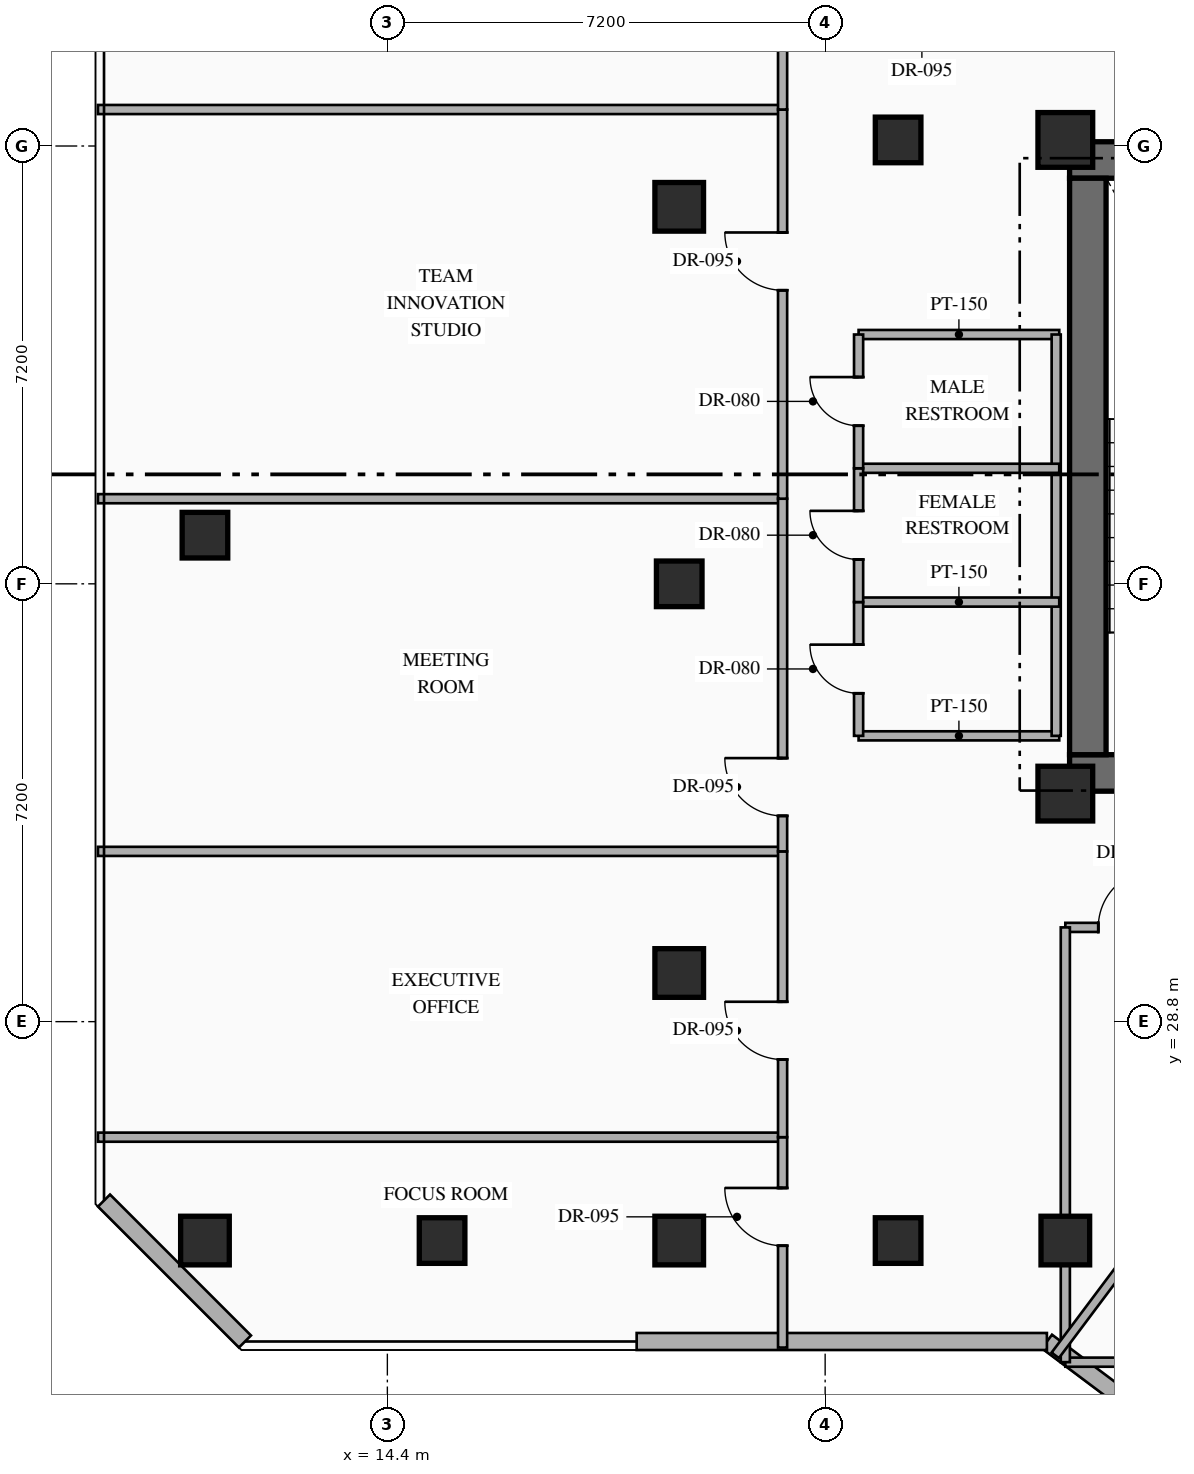
"""IFC4 building model, lengths in metres.
Left out: names, types, materials, properties, quantities, classifications, styles, units other than length and angle.
Written with IfcOpenShell. Run it as: python <this file> out.ifc"""

import sys

from ifc_helpers import new_model, si_unit, direction, frame, frame_2d, origin, origin_2d, place, context, subcontext, project, spatial, rectangle, hollow_rectangle, extrude, element, fill, save


model = new_model("IFC4")
c1 = context("Model", 3, precision=1e-05, world=origin(), true_north=direction((0.0, 1.0)))
c2 = subcontext(c1, "Body", "Model", "MODEL_VIEW")
j1 = project(units=[si_unit("LENGTHUNIT", "METRE"), si_unit("PLANEANGLEUNIT", "RADIAN")], contexts=[c1])
p1 = place(None, origin())
s1 = spatial("IfcSite", under=j1, at=p1, CompositionType="ELEMENT")
p2 = place(p1, origin())
s2 = spatial("IfcBuilding", under=s1, at=p2, CompositionType="ELEMENT")
p3 = place(p2, frame((0.0, 0.0, 163.65)))
s3 = spatial("IfcBuildingStorey", under=s2, at=p3, CompositionType="ELEMENT", Elevation=163.65)
p4 = place(p3, frame((25.62, 32.89, 0.0), z_axis=(0.0, 0.0, 1.0), x_axis=(1.0, 0.0, 0.0)))
e1 = element("IfcWall", 1, at=p4, inside=s3, PredefinedType="SHEAR", context=c2, shape_type="SweptSolid", body=[
    extrude(rectangle(XDim=7.78, YDim=0.6, at=frame_2d((3.89, 0.0))), origin(), (0.0, 0.0, 1.0), 3.6),
])
p5 = place(p4, frame((2.83, 0.0, 0.0)))
e2 = element("IfcOpeningElement", 2, at=p5, cuts=e1, PredefinedType="OPENING", context=c2, shape_type="SweptSolid", body=[
    extrude(rectangle(XDim=1.1, YDim=2.2, at=frame_2d((0.55, 1.1))), frame((0.0, 0.31, 0.0), z_axis=(0.0, -1.0, 0.0), x_axis=(1.0, 0.0, 0.0)), (0.0, 0.0, 1.0), 0.62),
])
p6 = place(p4, frame((5.58, 0.0, 0.0)))
e3 = element("IfcOpeningElement", 3, at=p6, cuts=e1, PredefinedType="OPENING", context=c2, shape_type="SweptSolid", body=[
    extrude(rectangle(XDim=1.1, YDim=2.15, at=frame_2d((0.55, 1.075))), frame((0.0, 0.31, 0.0), z_axis=(0.0, -1.0, 0.0), x_axis=(1.0, 0.0, 0.0)), (0.0, 0.0, 1.0), 0.62),
])
p7 = place(p3, frame((25.62, 42.97, 0.0), z_axis=(0.0, 0.0, 1.0), x_axis=(1.0, 0.0, 0.0)))
e4 = element("IfcWall", 4, at=p7, inside=s3, PredefinedType="SHEAR", context=c2, shape_type="SweptSolid", body=[
    extrude(rectangle(XDim=7.78, YDim=0.6, at=frame_2d((3.89, 0.0))), origin(), (0.0, 0.0, 1.0), 3.6),
])
p8 = place(p3, frame((25.92, 33.19, 0.0), z_axis=(0.0, 0.0, 1.0), x_axis=(0.0, 1.0, 0.0)))
e5 = element("IfcWall", 5, at=p8, inside=s3, PredefinedType="SHEAR", context=c2, shape_type="SweptSolid", body=[
    extrude(rectangle(XDim=9.48, YDim=0.6, at=frame_2d((4.74, 0.0))), origin(), (0.0, 0.0, 1.0), 3.6),
])
for number, where, z_axis, x_axis in (
    (6, (25.55, 32.55, 0.0), (0.0, 0.0, 1.0), (1.0, 0.0, 0.0)),
    (7, (25.55, 43.3, 0.0), (0.0, 0.0, 1.0), (1.0, 0.0, 0.0)),
):
    element("IfcColumn", number, at=place(p3, frame(where, z_axis=z_axis, x_axis=x_axis)), inside=s3, PredefinedType="COLUMN", context=c2, shape_type="SweptSolid", body=[
        extrude(rectangle(XDim=0.9, YDim=0.9, at=origin_2d()), origin(), (0.0, 0.0, 1.0), 3.6),
    ])
for number, where, z_axis, x_axis in (
    (8, (25.55, 25.2, 0.0), (0.0, 0.0, 1.0), (1.0, 0.0, 0.0)),
    (9, (11.4, 25.2, 0.0), (0.0, 0.0, 1.0), (1.0, 0.0, 0.0)),
    (10, (19.2, 25.2, 0.0), (0.0, 0.0, 1.0), (1.0, 0.0, 0.0)),
    (11, (19.2, 29.6, 0.0), (0.0, 0.0, 1.0), (1.0, 0.0, 0.0)),
    (12, (19.2, 42.2, 0.0), (0.0, 0.0, 1.0), (1.0, 0.0, 0.0)),
):
    element("IfcColumn", number, at=place(p3, frame(where, z_axis=z_axis, x_axis=x_axis)), inside=s3, PredefinedType="COLUMN", context=c2, shape_type="SweptSolid", body=[
        extrude(hollow_rectangle(XDim=0.8, YDim=0.8, WallThickness=0.032, at=origin_2d()), origin(), (0.0, 0.0, 1.0), 3.6),
    ])
for number, where, z_axis, x_axis in (
    (13, (22.8, 25.2, 0.0), (0.0, 0.0, 1.0), (1.0, 0.0, 0.0)),
    (14, (22.8, 43.3, 0.0), (0.0, 0.0, 1.0), (1.0, 0.0, 0.0)),
    (15, (11.4, 36.8, 0.0), (0.0, 0.0, 1.0), (1.0, 0.0, 0.0)),
    (16, (19.2, 36.0, 0.0), (0.0, 0.0, 1.0), (1.0, 0.0, 0.0)),
    (17, (15.3, 25.2, 0.0), (0.0, 0.0, 1.0), (1.0, 0.0, 0.0)),
):
    element("IfcColumn", number, at=place(p3, frame(where, z_axis=z_axis, x_axis=x_axis)), inside=s3, PredefinedType="COLUMN", context=c2, shape_type="SweptSolid", body=[
        extrude(hollow_rectangle(XDim=0.75, YDim=0.75, WallThickness=0.028, at=origin_2d()), origin(), (0.0, 0.0, 1.0), 3.6),
    ])
p9 = place(p3, frame((44.918, 8.787, 0.0), z_axis=(0.0, 0.0, 1.0), x_axis=(-0.800004765927, 0.599993645378, 0.0)))
e18 = element("IfcWall", 18, at=p9, inside=s3, PredefinedType="STANDARD", context=c2, shape_type="SweptSolid", body=[
    extrude(rectangle(XDim=24.588, YDim=0.28, at=frame_2d((12.294, 0.0))), origin(), (0.0, 0.0, 1.0), 3.35),
])
p10 = place(p3, frame((25.247, 23.54, 0.0), z_axis=(0.0, 0.0, 1.0), x_axis=(-1.0, 0.0, 0.0)))
e19 = element("IfcWall", 19, at=p10, inside=s3, PredefinedType="STANDARD", context=c2, shape_type="SweptSolid", body=[
    extrude(rectangle(XDim=6.747, YDim=0.28, at=frame_2d((3.374, 0.0))), origin(), (0.0, 0.0, 1.0), 3.35),
])
p11 = place(p3, frame((12.058, 23.54, 0.0), z_axis=(0.0, 0.0, 1.0), x_axis=(-0.707144017911, 0.707069542501, 0.0)))
e20 = element("IfcWall", 20, at=p11, inside=s3, PredefinedType="STANDARD", context=c2, shape_type="SweptSolid", body=[
    extrude(rectangle(XDim=3.278, YDim=0.28, at=frame_2d((1.639, 0.0))), origin(), (0.0, 0.0, 1.0), 3.35),
])
for number, where, z_axis, x_axis in (
    (21, (22.15, 33.5, 0.0), (0.0, 0.0, 1.0), (1.0, 0.0, 0.0)),
    (22, (22.15, 40.1, 0.0), (0.0, 0.0, 1.0), (1.0, 0.0, 0.0)),
):
    element("IfcWall", number, at=place(p3, frame(where, z_axis=z_axis, x_axis=x_axis)), inside=s3, PredefinedType="PARTITIONING", context=c2, shape_type="SweptSolid", body=[
        extrude(rectangle(XDim=3.3, YDim=0.15, at=frame_2d((1.65, 0.0))), origin(), (0.0, 0.0, 1.0), 3.35),
    ])
p12 = place(p3, frame((25.4, 33.5, 0.0), z_axis=(0.0, 0.0, 1.0), x_axis=(0.0, 1.0, 0.0)))
e23 = element("IfcWall", 23, at=p12, inside=s3, PredefinedType="PARTITIONING", context=c2, shape_type="SweptSolid", body=[
    extrude(rectangle(XDim=6.6, YDim=0.15, at=frame_2d((3.3, 0.0))), origin(), (0.0, 0.0, 1.0), 3.35),
])
for number, where, z_axis, x_axis in (
    (24, (22.15, 35.7, 0.0), (0.0, 0.0, 1.0), (1.0, 0.0, 0.0)),
    (25, (22.15, 37.9, 0.0), (0.0, 0.0, 1.0), (1.0, 0.0, 0.0)),
):
    element("IfcWall", number, at=place(p3, frame(where, z_axis=z_axis, x_axis=x_axis)), inside=s3, PredefinedType="PARTITIONING", context=c2, shape_type="SweptSolid", body=[
        extrude(rectangle(XDim=3.3, YDim=0.15, at=frame_2d((1.65, 0.0))), origin(), (0.0, 0.0, 1.0), 3.35),
    ])
p13 = place(p3, frame((22.15, 33.5, 0.0), z_axis=(0.0, 0.0, 1.0), x_axis=(0.0, 1.0, 0.0)))
e26 = element("IfcWall", 26, at=p13, inside=s3, PredefinedType="PARTITIONING", context=c2, shape_type="SweptSolid", body=[
    extrude(rectangle(XDim=2.2, YDim=0.15, at=frame_2d((1.1, 0.0))), origin(), (0.0, 0.0, 1.0), 3.35),
])
p14 = place(p13, frame((0.7, 0.0, 0.0)))
e27 = element("IfcOpeningElement", 27, at=p14, cuts=e26, PredefinedType="OPENING", context=c2, shape_type="SweptSolid", body=[
    extrude(rectangle(XDim=0.8, YDim=2.06, at=frame_2d((0.4, 1.03))), frame((0.0, 0.085, 0.0), z_axis=(0.0, -1.0, 0.0), x_axis=(1.0, 0.0, 0.0)), (0.0, 0.0, 1.0), 0.17),
])
p15 = place(p3, frame((22.15, 35.7, 0.0), z_axis=(0.0, 0.0, 1.0), x_axis=(0.0, 1.0, 0.0)))
e28 = element("IfcWall", 28, at=p15, inside=s3, PredefinedType="PARTITIONING", context=c2, shape_type="SweptSolid", body=[
    extrude(rectangle(XDim=2.2, YDim=0.15, at=frame_2d((1.1, 0.0))), origin(), (0.0, 0.0, 1.0), 3.35),
])
p16 = place(p15, frame((0.7, 0.0, 0.0)))
e29 = element("IfcOpeningElement", 29, at=p16, cuts=e28, PredefinedType="OPENING", context=c2, shape_type="SweptSolid", body=[
    extrude(rectangle(XDim=0.8, YDim=2.06, at=frame_2d((0.4, 1.03))), frame((0.0, 0.085, 0.0), z_axis=(0.0, -1.0, 0.0), x_axis=(1.0, 0.0, 0.0)), (0.0, 0.0, 1.0), 0.17),
])
p17 = place(p3, frame((22.15, 37.9, 0.0), z_axis=(0.0, 0.0, 1.0), x_axis=(0.0, 1.0, 0.0)))
e30 = element("IfcWall", 30, at=p17, inside=s3, PredefinedType="PARTITIONING", context=c2, shape_type="SweptSolid", body=[
    extrude(rectangle(XDim=2.2, YDim=0.15, at=frame_2d((1.1, 0.0))), origin(), (0.0, 0.0, 1.0), 3.35),
])
p18 = place(p17, frame((0.7, 0.0, 0.0)))
e31 = element("IfcOpeningElement", 31, at=p18, cuts=e30, PredefinedType="OPENING", context=c2, shape_type="SweptSolid", body=[
    extrude(rectangle(XDim=0.8, YDim=2.06, at=frame_2d((0.4, 1.03))), frame((0.0, 0.085, 0.0), z_axis=(0.0, -1.0, 0.0), x_axis=(1.0, 0.0, 0.0)), (0.0, 0.0, 1.0), 0.17),
])
p19 = place(p3, frame((25.55, 23.2, 0.0), z_axis=(0.0, 0.0, 1.0), x_axis=(1.0, 0.0, 0.0)))
e32 = element("IfcWall", 32, at=p19, inside=s3, PredefinedType="PARTITIONING", context=c2, shape_type="SweptSolid", body=[
    extrude(rectangle(XDim=4.95, YDim=0.15, at=frame_2d((2.475, 0.0))), origin(), (0.0, 0.0, 1.0), 3.35),
])
p20 = place(p3, frame((25.55, 30.35, 0.0), z_axis=(0.0, 0.0, 1.0), x_axis=(1.0, 0.0, 0.0)))
e33 = element("IfcWall", 33, at=p20, inside=s3, PredefinedType="PARTITIONING", context=c2, shape_type="SweptSolid", body=[
    extrude(rectangle(XDim=4.95, YDim=0.15, at=frame_2d((2.475, 0.0))), origin(), (0.0, 0.0, 1.0), 3.35),
])
p21 = place(p20, frame((0.542, 0.0, 0.0)))
e34 = element("IfcOpeningElement", 34, at=p21, cuts=e33, PredefinedType="OPENING", context=c2, shape_type="SweptSolid", body=[
    extrude(rectangle(XDim=0.95, YDim=2.15, at=frame_2d((0.475, 1.075))), frame((0.0, 0.085, 0.0), z_axis=(0.0, -1.0, 0.0), x_axis=(1.0, 0.0, 0.0)), (0.0, 0.0, 1.0), 0.17),
])
p22 = place(p3, frame((25.55, 23.2, 0.0), z_axis=(0.0, 0.0, 1.0), x_axis=(0.0, 1.0, 0.0)))
e35 = element("IfcWall", 35, at=p22, inside=s3, PredefinedType="PARTITIONING", context=c2, shape_type="SweptSolid", body=[
    extrude(rectangle(XDim=7.15, YDim=0.15, at=frame_2d((3.575, 0.0))), origin(), (0.0, 0.0, 1.0), 2.695),
])
p23 = place(p3, frame((9.64, 26.9, 0.0), z_axis=(0.0, 0.0, 1.0), x_axis=(1.0, 0.0, 0.0)))
e36 = element("IfcWall", 36, at=p23, inside=s3, PredefinedType="PARTITIONING", context=c2, shape_type="SweptSolid", body=[
    extrude(rectangle(XDim=11.26, YDim=0.15, at=frame_2d((5.63, 0.0))), origin(), (0.0, 0.0, 1.0), 3.35),
])
p24 = place(p3, frame((20.9, 23.44, 0.0), z_axis=(0.0, 0.0, 1.0), x_axis=(0.0, 1.0, 0.0)))
e37 = element("IfcWall", 37, at=p24, inside=s3, PredefinedType="PARTITIONING", context=c2, shape_type="SweptSolid", body=[
    extrude(rectangle(XDim=3.46, YDim=0.15, at=frame_2d((1.73, 0.0))), origin(), (0.0, 0.0, 1.0), 3.35),
])
p25 = place(p24, frame((1.675, 0.0, 0.0)))
e38 = element("IfcOpeningElement", 38, at=p25, cuts=e37, PredefinedType="OPENING", context=c2, shape_type="SweptSolid", body=[
    extrude(rectangle(XDim=0.95, YDim=2.15, at=frame_2d((0.475, 1.075))), frame((0.0, 0.085, 0.0), z_axis=(0.0, -1.0, 0.0), x_axis=(1.0, 0.0, 0.0)), (0.0, 0.0, 1.0), 0.17),
])
p26 = place(p3, frame((9.64, 31.6, 0.0), z_axis=(0.0, 0.0, 1.0), x_axis=(1.0, 0.0, 0.0)))
e39 = element("IfcWall", 39, at=p26, inside=s3, PredefinedType="PARTITIONING", context=c2, shape_type="SweptSolid", body=[
    extrude(rectangle(XDim=11.26, YDim=0.15, at=frame_2d((5.63, 0.0))), origin(), (0.0, 0.0, 1.0), 3.35),
])
p27 = place(p3, frame((20.9, 26.9, 0.0), z_axis=(0.0, 0.0, 1.0), x_axis=(0.0, 1.0, 0.0)))
e40 = element("IfcWall", 40, at=p27, inside=s3, PredefinedType="PARTITIONING", context=c2, shape_type="SweptSolid", body=[
    extrude(rectangle(XDim=4.7, YDim=0.15, at=frame_2d((2.35, 0.0))), origin(), (0.0, 0.0, 1.0), 3.35),
])
p28 = place(p27, frame((1.277, 0.0, 0.0)))
e41 = element("IfcOpeningElement", 41, at=p28, cuts=e40, PredefinedType="OPENING", context=c2, shape_type="SweptSolid", body=[
    extrude(rectangle(XDim=0.95, YDim=2.15, at=frame_2d((0.475, 1.075))), frame((0.0, 0.085, 0.0), z_axis=(0.0, -1.0, 0.0), x_axis=(1.0, 0.0, 0.0)), (0.0, 0.0, 1.0), 0.17),
])
p29 = place(p3, frame((9.64, 37.4, 0.0), z_axis=(0.0, 0.0, 1.0), x_axis=(1.0, 0.0, 0.0)))
e42 = element("IfcWall", 42, at=p29, inside=s3, PredefinedType="PARTITIONING", context=c2, shape_type="SweptSolid", body=[
    extrude(rectangle(XDim=11.26, YDim=0.15, at=frame_2d((5.63, 0.0))), origin(), (0.0, 0.0, 1.0), 3.35),
])
p30 = place(p3, frame((20.9, 31.6, 0.0), z_axis=(0.0, 0.0, 1.0), x_axis=(0.0, 1.0, 0.0)))
e43 = element("IfcWall", 43, at=p30, inside=s3, PredefinedType="PARTITIONING", context=c2, shape_type="SweptSolid", body=[
    extrude(rectangle(XDim=5.8, YDim=0.15, at=frame_2d((2.9, 0.0))), origin(), (0.0, 0.0, 1.0), 3.35),
])
p31 = place(p30, frame((0.584, 0.0, 0.0)))
e44 = element("IfcOpeningElement", 44, at=p31, cuts=e43, PredefinedType="OPENING", context=c2, shape_type="SweptSolid", body=[
    extrude(rectangle(XDim=0.95, YDim=2.15, at=frame_2d((0.475, 1.075))), frame((0.0, 0.085, 0.0), z_axis=(0.0, -1.0, 0.0), x_axis=(1.0, 0.0, 0.0)), (0.0, 0.0, 1.0), 0.17),
])
p32 = place(p3, frame((9.64, 43.8, 0.0), z_axis=(0.0, 0.0, 1.0), x_axis=(1.0, 0.0, 0.0)))
e45 = element("IfcWall", 45, at=p32, inside=s3, PredefinedType="PARTITIONING", context=c2, shape_type="SweptSolid", body=[
    extrude(rectangle(XDim=11.26, YDim=0.15, at=frame_2d((5.63, 0.0))), origin(), (0.0, 0.0, 1.0), 3.35),
])
p33 = place(p3, frame((20.9, 37.4, 0.0), z_axis=(0.0, 0.0, 1.0), x_axis=(0.0, 1.0, 0.0)))
e46 = element("IfcWall", 46, at=p33, inside=s3, PredefinedType="PARTITIONING", context=c2, shape_type="SweptSolid", body=[
    extrude(rectangle(XDim=6.4, YDim=0.15, at=frame_2d((3.2, 0.0))), origin(), (0.0, 0.0, 1.0), 3.35),
])
p34 = place(p33, frame((3.428, 0.0, 0.0)))
e47 = element("IfcOpeningElement", 47, at=p34, cuts=e46, PredefinedType="OPENING", context=c2, shape_type="SweptSolid", body=[
    extrude(rectangle(XDim=0.95, YDim=2.15, at=frame_2d((0.475, 1.075))), frame((0.0, 0.085, 0.0), z_axis=(0.0, -1.0, 0.0), x_axis=(1.0, 0.0, 0.0)), (0.0, 0.0, 1.0), 0.17),
])
p35 = place(p3, frame((20.9, 43.8, 0.0), z_axis=(0.0, 0.0, 1.0), x_axis=(0.0, 1.0, 0.0)))
e48 = element("IfcWall", 48, at=p35, inside=s3, PredefinedType="PARTITIONING", context=c2, shape_type="SweptSolid", body=[
    extrude(rectangle(XDim=6.56, YDim=0.15, at=frame_2d((3.28, 0.0))), origin(), (0.0, 0.0, 1.0), 3.35),
])
p36 = place(p35, frame((2.805, 0.0, 0.0)))
e49 = element("IfcOpeningElement", 49, at=p36, cuts=e48, PredefinedType="OPENING", context=c2, shape_type="SweptSolid", body=[
    extrude(rectangle(XDim=0.95, YDim=2.15, at=frame_2d((0.475, 1.075))), frame((0.0, 0.085, 0.0), z_axis=(0.0, -1.0, 0.0), x_axis=(1.0, 0.0, 0.0)), (0.0, 0.0, 1.0), 0.17),
])
p37 = place(p3, frame((25.384, 23.312, 0.0), z_axis=(0.0, 0.0, 1.0), x_axis=(0.599990721155, 0.80000695905, 0.0)))
e50 = element("IfcWall", 50, at=p37, inside=s3, PredefinedType="PARTITIONING", context=c2, shape_type="SweptSolid", body=[
    extrude(rectangle(XDim=4.21, YDim=0.15, at=frame_2d((2.105, 0.0))), origin(), (0.0, 0.0, 1.0), 3.35),
])
p38 = place(p14, origin())
e51 = element("IfcDoor", 51, at=p38, inside=s3, OperationType="SINGLE_SWING_RIGHT", PredefinedType="DOOR", context=c2, shape_type="SweptSolid", body=[
    extrude(rectangle(XDim=0.8, YDim=2.06, at=frame_2d((0.4, 1.03))), frame((0.0, 0.025, 0.0), z_axis=(0.0, -1.0, 0.0), x_axis=(1.0, 0.0, 0.0)), (0.0, 0.0, 1.0), 0.05),
])
fill(e27, e51)
p39 = place(p16, origin())
e52 = element("IfcDoor", 52, at=p39, inside=s3, OperationType="SINGLE_SWING_RIGHT", PredefinedType="DOOR", context=c2, shape_type="SweptSolid", body=[
    extrude(rectangle(XDim=0.8, YDim=2.06, at=frame_2d((0.4, 1.03))), frame((0.0, 0.025, 0.0), z_axis=(0.0, -1.0, 0.0), x_axis=(1.0, 0.0, 0.0)), (0.0, 0.0, 1.0), 0.05),
])
fill(e29, e52)
p40 = place(p18, origin())
e53 = element("IfcDoor", 53, at=p40, inside=s3, OperationType="SINGLE_SWING_RIGHT", PredefinedType="DOOR", context=c2, shape_type="SweptSolid", body=[
    extrude(rectangle(XDim=0.8, YDim=2.06, at=frame_2d((0.4, 1.03))), frame((0.0, 0.025, 0.0), z_axis=(0.0, -1.0, 0.0), x_axis=(1.0, 0.0, 0.0)), (0.0, 0.0, 1.0), 0.05),
])
fill(e31, e53)
p41 = place(p21, origin())
e54 = element("IfcDoor", 54, at=p41, inside=s3, OperationType="SINGLE_SWING_RIGHT", PredefinedType="DOOR", context=c2, shape_type="SweptSolid", body=[
    extrude(rectangle(XDim=0.95, YDim=2.15, at=frame_2d((0.475, 1.075))), frame((0.0, 0.025, 0.0), z_axis=(0.0, -1.0, 0.0), x_axis=(1.0, 0.0, 0.0)), (0.0, 0.0, 1.0), 0.05),
])
fill(e34, e54)
p42 = place(p25, origin())
e55 = element("IfcDoor", 55, at=p42, inside=s3, OperationType="SINGLE_SWING_RIGHT", PredefinedType="DOOR", context=c2, shape_type="SweptSolid", body=[
    extrude(rectangle(XDim=0.95, YDim=2.15, at=frame_2d((0.475, 1.075))), frame((0.0, 0.025, 0.0), z_axis=(0.0, -1.0, 0.0), x_axis=(1.0, 0.0, 0.0)), (0.0, 0.0, 1.0), 0.05),
])
fill(e38, e55)
p43 = place(p28, origin())
e56 = element("IfcDoor", 56, at=p43, inside=s3, OperationType="SINGLE_SWING_RIGHT", PredefinedType="DOOR", context=c2, shape_type="SweptSolid", body=[
    extrude(rectangle(XDim=0.95, YDim=2.15, at=frame_2d((0.475, 1.075))), frame((0.0, 0.025, 0.0), z_axis=(0.0, -1.0, 0.0), x_axis=(1.0, 0.0, 0.0)), (0.0, 0.0, 1.0), 0.05),
])
fill(e41, e56)
p44 = place(p31, origin())
e57 = element("IfcDoor", 57, at=p44, inside=s3, OperationType="SINGLE_SWING_RIGHT", PredefinedType="DOOR", context=c2, shape_type="SweptSolid", body=[
    extrude(rectangle(XDim=0.95, YDim=2.15, at=frame_2d((0.475, 1.075))), frame((0.0, 0.025, 0.0), z_axis=(0.0, -1.0, 0.0), x_axis=(1.0, 0.0, 0.0)), (0.0, 0.0, 1.0), 0.05),
])
fill(e44, e57)
p45 = place(p34, origin())
e58 = element("IfcDoor", 58, at=p45, inside=s3, OperationType="SINGLE_SWING_RIGHT", PredefinedType="DOOR", context=c2, shape_type="SweptSolid", body=[
    extrude(rectangle(XDim=0.95, YDim=2.15, at=frame_2d((0.475, 1.075))), frame((0.0, 0.025, 0.0), z_axis=(0.0, -1.0, 0.0), x_axis=(1.0, 0.0, 0.0)), (0.0, 0.0, 1.0), 0.05),
])
fill(e47, e58)
save(model, sys.argv[1])
